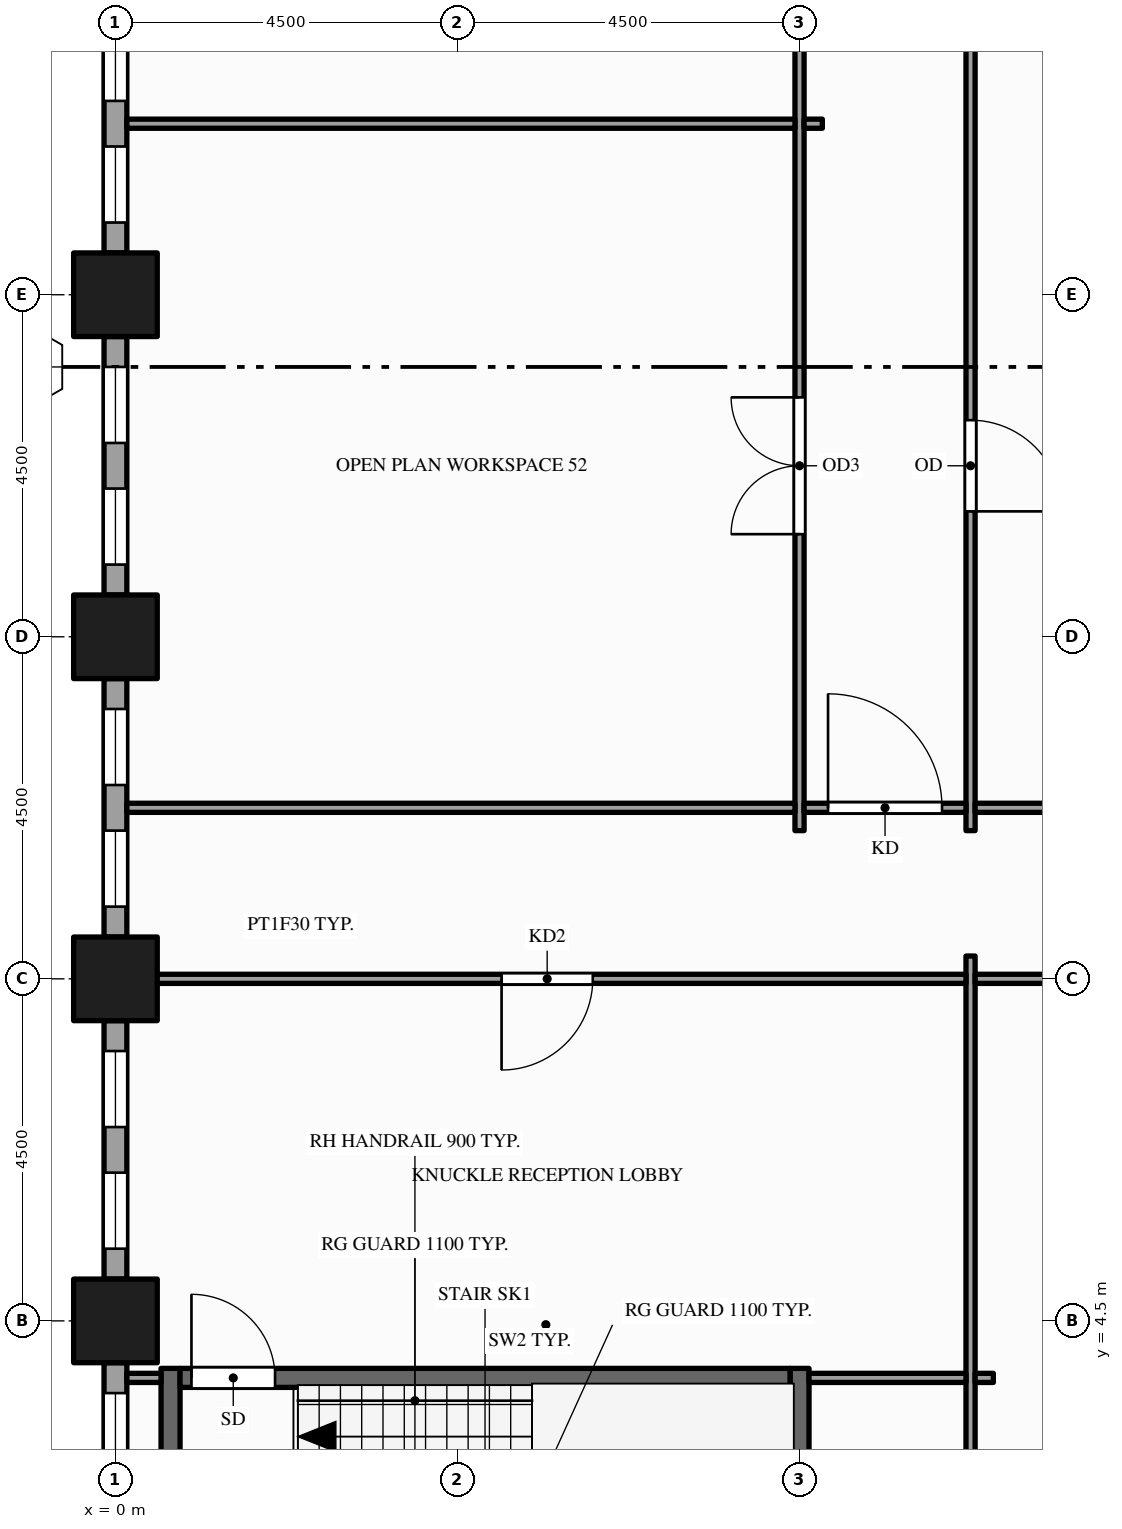
"""IFC4 building model, lengths in metres.
Left out: names, types, materials, properties, quantities, classifications, styles, units other than length and angle.
Written with IfcOpenShell. Run it as: python <this file> out.ifc"""

import sys

from ifc_helpers import new_model, si_unit, direction, frame, frame_2d, origin, origin_2d, place, context, subcontext, project, spatial, rectangle, hollow_rectangle, extrude, element, fill, save


model = new_model("IFC4")
c1 = context("Model", 3, precision=1e-05, world=origin(), true_north=direction((0.0, 1.0)))
c2 = subcontext(c1, "Body", "Model", "MODEL_VIEW")
j1 = project(units=[si_unit("LENGTHUNIT", "METRE"), si_unit("PLANEANGLEUNIT", "RADIAN")], contexts=[c1])
p1 = place(None, origin())
s1 = spatial("IfcSite", under=j1, at=p1, CompositionType="ELEMENT")
p2 = place(p1, origin())
s2 = spatial("IfcBuilding", under=s1, at=p2, CompositionType="ELEMENT")
p3 = place(p2, frame((0.0, 0.0, 69.0)))
s3 = spatial("IfcBuildingStorey", under=s2, at=p3, CompositionType="ELEMENT", Elevation=69.0)
for number, where, z_axis, x_axis in (
    (1, (0.0, 4.5, -0.15), (0.0, 0.0, 1.0), (1.0, 0.0, 0.0)),
    (2, (0.0, 9.0, -0.15), (0.0, 0.0, 1.0), (1.0, 0.0, 0.0)),
    (3, (0.0, 13.5, -0.15), (0.0, 0.0, 1.0), (1.0, 0.0, 0.0)),
    (4, (0.0, 18.0, -0.15), (0.0, 0.0, 1.0), (1.0, 0.0, 0.0)),
):
    element("IfcColumn", number, at=place(p3, frame(where, z_axis=z_axis, x_axis=x_axis)), inside=s3, PredefinedType="COLUMN", context=c2, shape_type="SweptSolid", body=[
        extrude(hollow_rectangle(XDim=1.1, YDim=1.1, WallThickness=0.06, at=origin_2d()), origin(), (0.0, 0.0, 1.0), 4.0),
    ])
p4 = place(p3, frame((0.0, 21.95, 0.0), z_axis=(0.0, 0.0, 1.0), x_axis=(0.0, -1.0, 0.0)))
e5 = element("IfcWall", 5, at=p4, inside=s3, PredefinedType="STANDARD", context=c2, shape_type="SweptSolid", body=[
    extrude(rectangle(XDim=3.4, YDim=0.3, at=frame_2d((1.7, 0.0))), origin(), (0.0, 0.0, 1.0), 3.144),
])
p5 = place(p4, frame((0.4, 0.0, 0.9)))
e6 = element("IfcOpeningElement", 6, at=p5, cuts=e5, PredefinedType="OPENING", context=c2, shape_type="SweptSolid", body=[
    extrude(rectangle(XDim=1.0, YDim=2.0, at=frame_2d((0.5, 1.0))), frame((0.0, 0.16, 0.0), z_axis=(0.0, -1.0, 0.0), x_axis=(1.0, 0.0, 0.0)), (0.0, 0.0, 1.0), 0.32),
])
p6 = place(p4, frame((2.0, 0.0, 0.9)))
e7 = element("IfcOpeningElement", 7, at=p6, cuts=e5, PredefinedType="OPENING", context=c2, shape_type="SweptSolid", body=[
    extrude(rectangle(XDim=1.0, YDim=2.0, at=frame_2d((0.5, 1.0))), frame((0.0, 0.16, 0.0), z_axis=(0.0, -1.0, 0.0), x_axis=(1.0, 0.0, 0.0)), (0.0, 0.0, 1.0), 0.32),
])
p7 = place(p3, frame((0.0, 17.45, 0.0), z_axis=(0.0, 0.0, 1.0), x_axis=(0.0, -1.0, 0.0)))
e8 = element("IfcWall", 8, at=p7, inside=s3, PredefinedType="STANDARD", context=c2, shape_type="SweptSolid", body=[
    extrude(rectangle(XDim=3.4, YDim=0.3, at=frame_2d((1.7, 0.0))), origin(), (0.0, 0.0, 1.0), 3.144),
])
p8 = place(p7, frame((0.4, 0.0, 0.9)))
e9 = element("IfcOpeningElement", 9, at=p8, cuts=e8, PredefinedType="OPENING", context=c2, shape_type="SweptSolid", body=[
    extrude(rectangle(XDim=1.0, YDim=2.0, at=frame_2d((0.5, 1.0))), frame((0.0, 0.16, 0.0), z_axis=(0.0, -1.0, 0.0), x_axis=(1.0, 0.0, 0.0)), (0.0, 0.0, 1.0), 0.32),
])
p9 = place(p7, frame((2.0, 0.0, 0.9)))
e10 = element("IfcOpeningElement", 10, at=p9, cuts=e8, PredefinedType="OPENING", context=c2, shape_type="SweptSolid", body=[
    extrude(rectangle(XDim=1.0, YDim=2.0, at=frame_2d((0.5, 1.0))), frame((0.0, 0.16, 0.0), z_axis=(0.0, -1.0, 0.0), x_axis=(1.0, 0.0, 0.0)), (0.0, 0.0, 1.0), 0.32),
])
p10 = place(p3, frame((0.0, 12.95, 0.0), z_axis=(0.0, 0.0, 1.0), x_axis=(0.0, -1.0, 0.0)))
e11 = element("IfcWall", 11, at=p10, inside=s3, PredefinedType="STANDARD", context=c2, shape_type="SweptSolid", body=[
    extrude(rectangle(XDim=3.4, YDim=0.3, at=frame_2d((1.7, 0.0))), origin(), (0.0, 0.0, 1.0), 3.144),
])
p11 = place(p10, frame((0.4, 0.0, 0.9)))
e12 = element("IfcOpeningElement", 12, at=p11, cuts=e11, PredefinedType="OPENING", context=c2, shape_type="SweptSolid", body=[
    extrude(rectangle(XDim=1.0, YDim=2.0, at=frame_2d((0.5, 1.0))), frame((0.0, 0.16, 0.0), z_axis=(0.0, -1.0, 0.0), x_axis=(1.0, 0.0, 0.0)), (0.0, 0.0, 1.0), 0.32),
])
p12 = place(p10, frame((2.0, 0.0, 0.9)))
e13 = element("IfcOpeningElement", 13, at=p12, cuts=e11, PredefinedType="OPENING", context=c2, shape_type="SweptSolid", body=[
    extrude(rectangle(XDim=1.0, YDim=2.0, at=frame_2d((0.5, 1.0))), frame((0.0, 0.16, 0.0), z_axis=(0.0, -1.0, 0.0), x_axis=(1.0, 0.0, 0.0)), (0.0, 0.0, 1.0), 0.32),
])
p13 = place(p3, frame((0.0, 8.45, 0.0), z_axis=(0.0, 0.0, 1.0), x_axis=(0.0, -1.0, 0.0)))
e14 = element("IfcWall", 14, at=p13, inside=s3, PredefinedType="STANDARD", context=c2, shape_type="SweptSolid", body=[
    extrude(rectangle(XDim=3.4, YDim=0.3, at=frame_2d((1.7, 0.0))), origin(), (0.0, 0.0, 1.0), 3.144),
])
p14 = place(p13, frame((0.4, 0.0, 0.9)))
e15 = element("IfcOpeningElement", 15, at=p14, cuts=e14, PredefinedType="OPENING", context=c2, shape_type="SweptSolid", body=[
    extrude(rectangle(XDim=1.0, YDim=2.0, at=frame_2d((0.5, 1.0))), frame((0.0, 0.16, 0.0), z_axis=(0.0, -1.0, 0.0), x_axis=(1.0, 0.0, 0.0)), (0.0, 0.0, 1.0), 0.32),
])
p15 = place(p13, frame((2.0, 0.0, 0.9)))
e16 = element("IfcOpeningElement", 16, at=p15, cuts=e14, PredefinedType="OPENING", context=c2, shape_type="SweptSolid", body=[
    extrude(rectangle(XDim=1.0, YDim=2.0, at=frame_2d((0.5, 1.0))), frame((0.0, 0.16, 0.0), z_axis=(0.0, -1.0, 0.0), x_axis=(1.0, 0.0, 0.0)), (0.0, 0.0, 1.0), 0.32),
])
p16 = place(p3, frame((0.0, 3.95, 0.0), z_axis=(0.0, 0.0, 1.0), x_axis=(0.0, -1.0, 0.0)))
e17 = element("IfcWall", 17, at=p16, inside=s3, PredefinedType="STANDARD", context=c2, shape_type="SweptSolid", body=[
    extrude(rectangle(XDim=3.4, YDim=0.3, at=frame_2d((1.7, 0.0))), origin(), (0.0, 0.0, 1.0), 3.144),
])
p17 = place(p16, frame((0.4, 0.0, 0.9)))
e18 = element("IfcOpeningElement", 18, at=p17, cuts=e17, PredefinedType="OPENING", context=c2, shape_type="SweptSolid", body=[
    extrude(rectangle(XDim=1.0, YDim=2.0, at=frame_2d((0.5, 1.0))), frame((0.0, 0.16, 0.0), z_axis=(0.0, -1.0, 0.0), x_axis=(1.0, 0.0, 0.0)), (0.0, 0.0, 1.0), 0.32),
])
p18 = place(p16, frame((2.0, 0.0, 0.9)))
e19 = element("IfcOpeningElement", 19, at=p18, cuts=e17, PredefinedType="OPENING", context=c2, shape_type="SweptSolid", body=[
    extrude(rectangle(XDim=1.0, YDim=2.0, at=frame_2d((0.5, 1.0))), frame((0.0, 0.16, 0.0), z_axis=(0.0, -1.0, 0.0), x_axis=(1.0, 0.0, 0.0)), (0.0, 0.0, 1.0), 0.32),
])
p19 = place(p3, frame((0.725, 0.6, 0.0), z_axis=(0.0, 0.0, 1.0), x_axis=(0.0, 1.0, 0.0)))
e20 = element("IfcWall", 20, at=p19, inside=s3, PredefinedType="SHEAR", context=c2, shape_type="SweptSolid", body=[
    extrude(rectangle(XDim=3.275, YDim=0.25, at=frame_2d((1.637, 0.0))), origin(), (0.0, 0.0, 1.0), 3.85),
])
p20 = place(p3, frame((9.0, 0.55, 0.0), z_axis=(0.0, 0.0, 1.0), x_axis=(0.0, 1.0, 0.0)))
e21 = element("IfcWall", 21, at=p20, inside=s3, PredefinedType="SHEAR", context=c2, shape_type="SweptSolid", body=[
    extrude(rectangle(XDim=3.325, YDim=0.25, at=frame_2d((1.663, 0.0))), origin(), (0.0, 0.0, 1.0), 3.85),
])
p21 = place(p3, frame((9.0, 10.95, 0.0), z_axis=(0.0, 0.0, 1.0), x_axis=(0.0, 1.0, 0.0)))
e22 = element("IfcWall", 22, at=p21, inside=s3, PredefinedType="PARTITIONING", context=c2, shape_type="SweptSolid", body=[
    extrude(rectangle(XDim=20.85, YDim=0.12, at=frame_2d((10.425, 0.0))), origin(), (0.0, 0.0, 1.0), 2.6),
])
p22 = place(p21, frame((3.9, 0.0, 0.0)))
e23 = element("IfcOpeningElement", 23, at=p22, cuts=e22, PredefinedType="OPENING", context=c2, shape_type="SweptSolid", body=[
    extrude(rectangle(XDim=1.8, YDim=2.1, at=frame_2d((0.9, 1.05))), frame((0.0, 0.07, 0.0), z_axis=(0.0, -1.0, 0.0), x_axis=(1.0, 0.0, 0.0)), (0.0, 0.0, 1.0), 0.14),
])
p23 = place(p21, frame((12.205, 0.0, 0.0)))
e24 = element("IfcOpeningElement", 24, at=p23, cuts=e22, PredefinedType="OPENING", context=c2, shape_type="SweptSolid", body=[
    extrude(rectangle(XDim=1.0, YDim=2.1, at=frame_2d((0.5, 1.05))), frame((0.0, 0.07, 0.0), z_axis=(0.0, -1.0, 0.0), x_axis=(1.0, 0.0, 0.0)), (0.0, 0.0, 1.0), 0.14),
])
p24 = place(p3, frame((11.25, 0.15, 0.0), z_axis=(0.0, 0.0, 1.0), x_axis=(0.0, 1.0, 0.0)))
e25 = element("IfcWall", 25, at=p24, inside=s3, PredefinedType="PARTITIONING", context=c2, shape_type="SweptSolid", body=[
    extrude(rectangle(XDim=9.15, YDim=0.12, at=frame_2d((4.575, 0.0))), origin(), (0.0, 0.0, 1.0), 2.938),
])
p25 = place(p3, frame((11.25, 10.95, 0.0), z_axis=(0.0, 0.0, 1.0), x_axis=(0.0, 1.0, 0.0)))
e26 = element("IfcWall", 26, at=p25, inside=s3, PredefinedType="PARTITIONING", context=c2, shape_type="SweptSolid", body=[
    extrude(rectangle(XDim=20.85, YDim=0.12, at=frame_2d((10.425, 0.0))), origin(), (0.0, 0.0, 1.0), 2.6),
])
p26 = place(p25, frame((4.2, 0.0, 0.0)))
e27 = element("IfcOpeningElement", 27, at=p26, cuts=e26, PredefinedType="OPENING", context=c2, shape_type="SweptSolid", body=[
    extrude(rectangle(XDim=1.2, YDim=2.1, at=frame_2d((0.6, 1.05))), frame((0.0, 0.07, 0.0), z_axis=(0.0, -1.0, 0.0), x_axis=(1.0, 0.0, 0.0)), (0.0, 0.0, 1.0), 0.14),
])
p27 = place(p3, frame((0.15, 3.75, 0.0), z_axis=(0.0, 0.0, 1.0), x_axis=(1.0, 0.0, 0.0)))
e28 = element("IfcWall", 28, at=p27, inside=s3, PredefinedType="PARTITIONING", context=c2, shape_type="SweptSolid", body=[
    extrude(rectangle(XDim=0.45, YDim=0.12, at=frame_2d((0.225, 0.0))), origin(), (0.0, 0.0, 1.0), 3.144),
])
p28 = place(p3, frame((0.85, 3.75, 0.0), z_axis=(0.0, 0.0, 1.0), x_axis=(1.0, 0.0, 0.0)))
e29 = element("IfcWall", 29, at=p28, inside=s3, PredefinedType="SHEAR", context=c2, shape_type="SweptSolid", body=[
    extrude(rectangle(XDim=8.025, YDim=0.25, at=frame_2d((4.012, 0.0))), origin(), (0.0, 0.0, 1.0), 3.85),
])
p29 = place(p28, frame((0.15, 0.0, 0.0)))
e30 = element("IfcOpeningElement", 30, at=p29, cuts=e29, PredefinedType="OPENING", context=c2, shape_type="SweptSolid", body=[
    extrude(rectangle(XDim=1.1, YDim=2.1, at=frame_2d((0.55, 1.05))), frame((0.0, 0.135, 0.0), z_axis=(0.0, -1.0, 0.0), x_axis=(1.0, 0.0, 0.0)), (0.0, 0.0, 1.0), 0.27),
])
p30 = place(p3, frame((9.125, 3.75, 0.0), z_axis=(0.0, 0.0, 1.0), x_axis=(1.0, 0.0, 0.0)))
e31 = element("IfcWall", 31, at=p30, inside=s3, PredefinedType="PARTITIONING", context=c2, shape_type="SweptSolid", body=[
    extrude(rectangle(XDim=2.065, YDim=0.12, at=frame_2d((1.032, 0.0))), origin(), (0.0, 0.0, 1.0), 2.938),
])
p31 = place(p3, frame((11.31, 3.75, 0.0), z_axis=(0.0, 0.0, 1.0), x_axis=(1.0, 0.0, 0.0)))
e32 = element("IfcWall", 32, at=p31, inside=s3, PredefinedType="PARTITIONING", context=c2, shape_type="SweptSolid", body=[
    extrude(rectangle(XDim=0.24, YDim=0.12, at=frame_2d((0.12, 0.0))), origin(), (0.0, 0.0, 1.0), 2.938),
])
p32 = place(p3, frame((0.15, 9.0, 0.0), z_axis=(0.0, 0.0, 1.0), x_axis=(1.0, 0.0, 0.0)))
e33 = element("IfcWall", 33, at=p32, inside=s3, PredefinedType="PARTITIONING", context=c2, shape_type="SweptSolid", body=[
    extrude(rectangle(XDim=11.04, YDim=0.12, at=frame_2d((5.52, 0.0))), origin(), (0.0, 0.0, 1.0), 2.938),
])
p33 = place(p32, frame((4.93, 0.0, 0.0)))
e34 = element("IfcOpeningElement", 34, at=p33, cuts=e33, PredefinedType="OPENING", context=c2, shape_type="SweptSolid", body=[
    extrude(rectangle(XDim=1.2, YDim=2.1, at=frame_2d((0.6, 1.05))), frame((0.0, 0.07, 0.0), z_axis=(0.0, -1.0, 0.0), x_axis=(1.0, 0.0, 0.0)), (0.0, 0.0, 1.0), 0.14),
])
p34 = place(p3, frame((11.31, 9.0, 0.0), z_axis=(0.0, 0.0, 1.0), x_axis=(1.0, 0.0, 0.0)))
e35 = element("IfcWall", 35, at=p34, inside=s3, PredefinedType="PARTITIONING", context=c2, shape_type="SweptSolid", body=[
    extrude(rectangle(XDim=4.38, YDim=0.12, at=frame_2d((2.19, 0.0))), origin(), (0.0, 0.0, 1.0), 2.938),
])
p35 = place(p34, frame((1.69, 0.0, 0.0)))
e36 = element("IfcOpeningElement", 36, at=p35, cuts=e35, PredefinedType="OPENING", context=c2, shape_type="SweptSolid", body=[
    extrude(rectangle(XDim=1.0, YDim=2.1, at=frame_2d((0.5, 1.05))), frame((0.0, 0.07, 0.0), z_axis=(0.0, -1.0, 0.0), x_axis=(1.0, 0.0, 0.0)), (0.0, 0.0, 1.0), 0.14),
])
p36 = place(p3, frame((0.15, 11.25, 0.0), z_axis=(0.0, 0.0, 1.0), x_axis=(1.0, 0.0, 0.0)))
e37 = element("IfcWall", 37, at=p36, inside=s3, PredefinedType="PARTITIONING", context=c2, shape_type="SweptSolid", body=[
    extrude(rectangle(XDim=8.79, YDim=0.12, at=frame_2d((4.395, 0.0))), origin(), (0.0, 0.0, 1.0), 2.938),
])
p37 = place(p3, frame((9.06, 11.25, 0.0), z_axis=(0.0, 0.0, 1.0), x_axis=(1.0, 0.0, 0.0)))
e38 = element("IfcWall", 38, at=p37, inside=s3, PredefinedType="PARTITIONING", context=c2, shape_type="SweptSolid", body=[
    extrude(rectangle(XDim=2.13, YDim=0.12, at=frame_2d((1.065, 0.0))), origin(), (0.0, 0.0, 1.0), 2.938),
])
p38 = place(p37, frame((0.315, 0.0, 0.0)))
e39 = element("IfcOpeningElement", 39, at=p38, cuts=e38, PredefinedType="OPENING", context=c2, shape_type="SweptSolid", body=[
    extrude(rectangle(XDim=1.5, YDim=2.1, at=frame_2d((0.75, 1.05))), frame((0.0, 0.07, 0.0), z_axis=(0.0, -1.0, 0.0), x_axis=(1.0, 0.0, 0.0)), (0.0, 0.0, 1.0), 0.14),
])
p39 = place(p3, frame((11.31, 11.25, 0.0), z_axis=(0.0, 0.0, 1.0), x_axis=(1.0, 0.0, 0.0)))
e40 = element("IfcWall", 40, at=p39, inside=s3, PredefinedType="PARTITIONING", context=c2, shape_type="SweptSolid", body=[
    extrude(rectangle(XDim=15.63, YDim=0.12, at=frame_2d((7.815, 0.0))), origin(), (0.0, 0.0, 1.0), 2.938),
])
p40 = place(p39, frame((3.54, 0.0, 0.0)))
e41 = element("IfcOpeningElement", 41, at=p40, cuts=e40, PredefinedType="OPENING", context=c2, shape_type="SweptSolid", body=[
    extrude(rectangle(XDim=1.8, YDim=2.1, at=frame_2d((0.9, 1.05))), frame((0.0, 0.07, 0.0), z_axis=(0.0, -1.0, 0.0), x_axis=(1.0, 0.0, 0.0)), (0.0, 0.0, 1.0), 0.14),
])
p41 = place(p3, frame((0.15, 20.25, 0.0), z_axis=(0.0, 0.0, 1.0), x_axis=(1.0, 0.0, 0.0)))
e42 = element("IfcWall", 42, at=p41, inside=s3, PredefinedType="PARTITIONING", context=c2, shape_type="SweptSolid", body=[
    extrude(rectangle(XDim=8.79, YDim=0.12, at=frame_2d((4.395, 0.0))), origin(), (0.0, 0.0, 1.0), 2.938),
])
p42 = place(p3, frame((9.06, 20.25, 0.0), z_axis=(0.0, 0.0, 1.0), x_axis=(1.0, 0.0, 0.0)))
e43 = element("IfcWall", 43, at=p42, inside=s3, PredefinedType="PARTITIONING", context=c2, shape_type="SweptSolid", body=[
    extrude(rectangle(XDim=0.24, YDim=0.12, at=frame_2d((0.12, 0.0))), origin(), (0.0, 0.0, 1.0), 2.938),
])
p43 = place(p5, origin())
e44 = element("IfcWindow", 44, at=p43, inside=s3, PartitioningType="SINGLE_PANEL", PredefinedType="WINDOW", context=c2, shape_type="SweptSolid", body=[
    extrude(rectangle(XDim=1.0, YDim=2.0, at=frame_2d((0.5, 1.0))), frame((0.0, 0.03, 0.0), z_axis=(0.0, -1.0, 0.0), x_axis=(1.0, 0.0, 0.0)), (0.0, 0.0, 1.0), 0.06),
])
fill(e6, e44)
p44 = place(p6, origin())
e45 = element("IfcWindow", 45, at=p44, inside=s3, PartitioningType="SINGLE_PANEL", PredefinedType="WINDOW", context=c2, shape_type="SweptSolid", body=[
    extrude(rectangle(XDim=1.0, YDim=2.0, at=frame_2d((0.5, 1.0))), frame((0.0, 0.03, 0.0), z_axis=(0.0, -1.0, 0.0), x_axis=(1.0, 0.0, 0.0)), (0.0, 0.0, 1.0), 0.06),
])
fill(e7, e45)
p45 = place(p8, origin())
e46 = element("IfcWindow", 46, at=p45, inside=s3, PartitioningType="SINGLE_PANEL", PredefinedType="WINDOW", context=c2, shape_type="SweptSolid", body=[
    extrude(rectangle(XDim=1.0, YDim=2.0, at=frame_2d((0.5, 1.0))), frame((0.0, 0.03, 0.0), z_axis=(0.0, -1.0, 0.0), x_axis=(1.0, 0.0, 0.0)), (0.0, 0.0, 1.0), 0.06),
])
fill(e9, e46)
p46 = place(p9, origin())
e47 = element("IfcWindow", 47, at=p46, inside=s3, PartitioningType="SINGLE_PANEL", PredefinedType="WINDOW", context=c2, shape_type="SweptSolid", body=[
    extrude(rectangle(XDim=1.0, YDim=2.0, at=frame_2d((0.5, 1.0))), frame((0.0, 0.03, 0.0), z_axis=(0.0, -1.0, 0.0), x_axis=(1.0, 0.0, 0.0)), (0.0, 0.0, 1.0), 0.06),
])
fill(e10, e47)
p47 = place(p11, origin())
e48 = element("IfcWindow", 48, at=p47, inside=s3, PartitioningType="SINGLE_PANEL", PredefinedType="WINDOW", context=c2, shape_type="SweptSolid", body=[
    extrude(rectangle(XDim=1.0, YDim=2.0, at=frame_2d((0.5, 1.0))), frame((0.0, 0.03, 0.0), z_axis=(0.0, -1.0, 0.0), x_axis=(1.0, 0.0, 0.0)), (0.0, 0.0, 1.0), 0.06),
])
fill(e12, e48)
p48 = place(p12, origin())
e49 = element("IfcWindow", 49, at=p48, inside=s3, PartitioningType="SINGLE_PANEL", PredefinedType="WINDOW", context=c2, shape_type="SweptSolid", body=[
    extrude(rectangle(XDim=1.0, YDim=2.0, at=frame_2d((0.5, 1.0))), frame((0.0, 0.03, 0.0), z_axis=(0.0, -1.0, 0.0), x_axis=(1.0, 0.0, 0.0)), (0.0, 0.0, 1.0), 0.06),
])
fill(e13, e49)
p49 = place(p14, origin())
e50 = element("IfcWindow", 50, at=p49, inside=s3, PartitioningType="SINGLE_PANEL", PredefinedType="WINDOW", context=c2, shape_type="SweptSolid", body=[
    extrude(rectangle(XDim=1.0, YDim=2.0, at=frame_2d((0.5, 1.0))), frame((0.0, 0.03, 0.0), z_axis=(0.0, -1.0, 0.0), x_axis=(1.0, 0.0, 0.0)), (0.0, 0.0, 1.0), 0.06),
])
fill(e15, e50)
p50 = place(p15, origin())
e51 = element("IfcWindow", 51, at=p50, inside=s3, PartitioningType="SINGLE_PANEL", PredefinedType="WINDOW", context=c2, shape_type="SweptSolid", body=[
    extrude(rectangle(XDim=1.0, YDim=2.0, at=frame_2d((0.5, 1.0))), frame((0.0, 0.03, 0.0), z_axis=(0.0, -1.0, 0.0), x_axis=(1.0, 0.0, 0.0)), (0.0, 0.0, 1.0), 0.06),
])
fill(e16, e51)
p51 = place(p17, origin())
e52 = element("IfcWindow", 52, at=p51, inside=s3, PartitioningType="SINGLE_PANEL", PredefinedType="WINDOW", context=c2, shape_type="SweptSolid", body=[
    extrude(rectangle(XDim=1.0, YDim=2.0, at=frame_2d((0.5, 1.0))), frame((0.0, 0.03, 0.0), z_axis=(0.0, -1.0, 0.0), x_axis=(1.0, 0.0, 0.0)), (0.0, 0.0, 1.0), 0.06),
])
fill(e18, e52)
p52 = place(p29, origin())
e53 = element("IfcDoor", 53, at=p52, inside=s3, OperationType="SINGLE_SWING_LEFT", PredefinedType="DOOR", context=c2, shape_type="SweptSolid", body=[
    extrude(rectangle(XDim=1.1, YDim=2.1, at=frame_2d((0.55, 1.05))), frame((0.0, 0.025, 0.0), z_axis=(0.0, -1.0, 0.0), x_axis=(1.0, 0.0, 0.0)), (0.0, 0.0, 1.0), 0.05),
])
fill(e30, e53)
p53 = place(p33, origin())
e54 = element("IfcDoor", 54, at=p53, inside=s3, OperationType="SINGLE_SWING_LEFT", PredefinedType="DOOR", context=c2, shape_type="SweptSolid", body=[
    extrude(rectangle(XDim=1.2, YDim=2.1, at=frame_2d((0.6, 1.05))), frame((0.0, 0.025, 0.0), z_axis=(0.0, -1.0, 0.0), x_axis=(1.0, 0.0, 0.0)), (0.0, 0.0, 1.0), 0.05),
])
fill(e34, e54)
p54 = place(p38, origin())
e55 = element("IfcDoor", 55, at=p54, inside=s3, OperationType="SINGLE_SWING_LEFT", PredefinedType="DOOR", context=c2, shape_type="SweptSolid", body=[
    extrude(rectangle(XDim=1.5, YDim=2.1, at=frame_2d((0.75, 1.05))), frame((0.0, 0.025, 0.0), z_axis=(0.0, -1.0, 0.0), x_axis=(1.0, 0.0, 0.0)), (0.0, 0.0, 1.0), 0.05),
])
fill(e39, e55)
p55 = place(p22, origin())
e56 = element("IfcDoor", 56, at=p55, inside=s3, OperationType="DOUBLE_DOOR_SINGLE_SWING", PredefinedType="DOOR", context=c2, shape_type="SweptSolid", body=[
    extrude(rectangle(XDim=1.8, YDim=2.1, at=frame_2d((0.9, 1.05))), frame((0.0, 0.025, 0.0), z_axis=(0.0, -1.0, 0.0), x_axis=(1.0, 0.0, 0.0)), (0.0, 0.0, 1.0), 0.05),
])
fill(e23, e56)
p56 = place(p26, origin())
e57 = element("IfcDoor", 57, at=p56, inside=s3, OperationType="SINGLE_SWING_LEFT", PredefinedType="DOOR", context=c2, shape_type="SweptSolid", body=[
    extrude(rectangle(XDim=1.2, YDim=2.1, at=frame_2d((0.6, 1.05))), frame((0.0, 0.025, 0.0), z_axis=(0.0, -1.0, 0.0), x_axis=(1.0, 0.0, 0.0)), (0.0, 0.0, 1.0), 0.05),
])
fill(e27, e57)
save(model, sys.argv[1])
